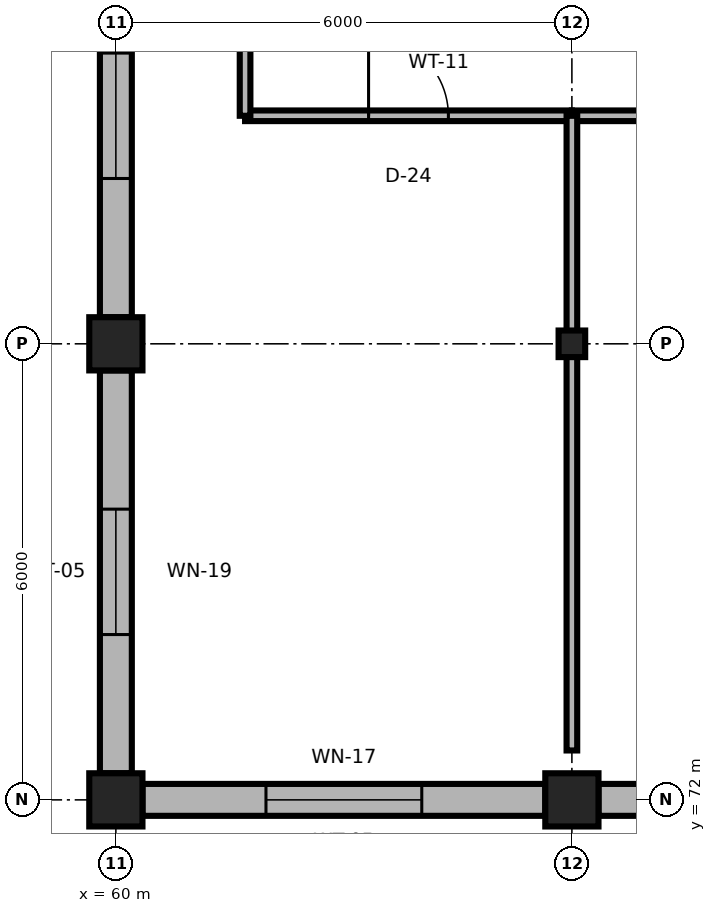
"""IFC4 building model, lengths in metres.
Left out: names, types, materials, properties, quantities, classifications, styles, units other than length and angle.
Written with IfcOpenShell. Run it as: python <this file> out.ifc"""

import sys

from ifc_helpers import new_model, si_unit, direction, frame, frame_2d, origin, origin_2d, place, context, subcontext, project, spatial, rectangle, i_section, extrude, element, fill, save


model = new_model("IFC4")
c1 = context("Model", 3, precision=1e-05, world=origin(), true_north=direction((0.0, 1.0)))
c2 = subcontext(c1, "Body", "Model", "MODEL_VIEW")
j1 = project(units=[si_unit("LENGTHUNIT", "METRE"), si_unit("PLANEANGLEUNIT", "RADIAN")], contexts=[c1])
p1 = place(None, origin())
s1 = spatial("IfcSite", under=j1, at=p1, CompositionType="ELEMENT")
p2 = place(p1, origin())
s2 = spatial("IfcBuilding", under=s1, at=p2, CompositionType="ELEMENT")
p3 = place(p2, frame((0.0, 0.0, 40.5)))
s3 = spatial("IfcBuildingStorey", under=s2, at=p3, CompositionType="ELEMENT", Elevation=40.5)
for number, where, z_axis, x_axis in (
    (1, (60.0, 72.0, 0.0), (0.0, 0.0, 1.0), (1.0, 0.0, 0.0)),
    (2, (66.0, 72.0, 0.0), (0.0, 0.0, 1.0), (1.0, 0.0, 0.0)),
    (3, (60.0, 78.0, 0.0), (0.0, 0.0, 1.0), (1.0, 0.0, 0.0)),
):
    element("IfcColumn", number, at=place(p3, frame(where, z_axis=z_axis, x_axis=x_axis)), inside=s3, PredefinedType="COLUMN", context=c2, shape_type="SweptSolid", body=[
        extrude(rectangle(XDim=0.7, YDim=0.7, at=origin_2d()), origin(), (0.0, 0.0, 1.0), 3.9),
    ])
p4 = place(p3, frame((66.0, 78.0, 0.0), z_axis=(0.0, 0.0, 1.0), x_axis=(1.0, 0.0, 0.0)))
e4 = element("IfcColumn", 4, at=p4, inside=s3, PredefinedType="COLUMN", context=c2, shape_type="SweptSolid", body=[
    extrude(i_section(OverallWidth=0.35, OverallDepth=0.35, WebThickness=0.012, FlangeThickness=0.019, FilletRadius=0.02, at=origin_2d()), origin(), (0.0, 0.0, 1.0), 3.9),
])
p5 = place(p3, frame((60.35, 72.0, 0.0), z_axis=(0.0, 0.0, 1.0), x_axis=(1.0, 0.0, 0.0)))
e5 = element("IfcWall", 5, at=p5, inside=s3, PredefinedType="SOLIDWALL", context=c2, shape_type="SweptSolid", body=[
    extrude(rectangle(XDim=5.3, YDim=0.42, at=frame_2d((2.65, 0.0))), origin(), (0.0, 0.0, 1.0), 3.32),
])
p6 = place(p5, frame((1.625, 0.0, 0.85)))
e6 = element("IfcOpeningElement", 6, at=p6, cuts=e5, PredefinedType="OPENING", context=c2, shape_type="SweptSolid", body=[
    extrude(rectangle(XDim=2.05, YDim=2.0, at=frame_2d((1.025, 1.0))), frame((0.0, 0.225, 0.0), z_axis=(0.0, -1.0, 0.0), x_axis=(1.0, 0.0, 0.0)), (0.0, 0.0, 1.0), 0.45),
])
p7 = place(p3, frame((66.35, 72.0, 0.0), z_axis=(0.0, 0.0, 1.0), x_axis=(1.0, 0.0, 0.0)))
e7 = element("IfcWall", 7, at=p7, inside=s3, PredefinedType="SOLIDWALL", context=c2, shape_type="SweptSolid", body=[
    extrude(rectangle(XDim=5.3, YDim=0.42, at=frame_2d((2.65, 0.0))), origin(), (0.0, 0.0, 1.0), 3.32),
])
p8 = place(p7, frame((1.625, 0.0, 0.85)))
e8 = element("IfcOpeningElement", 8, at=p8, cuts=e7, PredefinedType="OPENING", context=c2, shape_type="SweptSolid", body=[
    extrude(rectangle(XDim=2.05, YDim=2.0, at=frame_2d((1.025, 1.0))), frame((0.0, 0.225, 0.0), z_axis=(0.0, -1.0, 0.0), x_axis=(1.0, 0.0, 0.0)), (0.0, 0.0, 1.0), 0.45),
])
p9 = place(p3, frame((60.0, 72.35, 0.0), z_axis=(0.0, 0.0, 1.0), x_axis=(0.0, 1.0, 0.0)))
e9 = element("IfcWall", 9, at=p9, inside=s3, PredefinedType="SOLIDWALL", context=c2, shape_type="SweptSolid", body=[
    extrude(rectangle(XDim=5.3, YDim=0.42, at=frame_2d((2.65, 0.0))), origin(), (0.0, 0.0, 1.0), 3.32),
])
p10 = place(p9, frame((1.825, 0.0, 0.85)))
e10 = element("IfcOpeningElement", 10, at=p10, cuts=e9, PredefinedType="OPENING", context=c2, shape_type="SweptSolid", body=[
    extrude(rectangle(XDim=1.65, YDim=1.95, at=frame_2d((0.825, 0.975))), frame((0.0, 0.225, 0.0), z_axis=(0.0, -1.0, 0.0), x_axis=(1.0, 0.0, 0.0)), (0.0, 0.0, 1.0), 0.45),
])
p11 = place(p3, frame((60.0, 78.35, 0.0), z_axis=(0.0, 0.0, 1.0), x_axis=(0.0, 1.0, 0.0)))
e11 = element("IfcWall", 11, at=p11, inside=s3, PredefinedType="SOLIDWALL", context=c2, shape_type="SweptSolid", body=[
    extrude(rectangle(XDim=5.3, YDim=0.42, at=frame_2d((2.65, 0.0))), origin(), (0.0, 0.0, 1.0), 3.32),
])
p12 = place(p11, frame((1.825, 0.0, 0.85)))
e12 = element("IfcOpeningElement", 12, at=p12, cuts=e11, PredefinedType="OPENING", context=c2, shape_type="SweptSolid", body=[
    extrude(rectangle(XDim=1.65, YDim=1.95, at=frame_2d((0.825, 0.975))), frame((0.0, 0.225, 0.0), z_axis=(0.0, -1.0, 0.0), x_axis=(1.0, 0.0, 0.0)), (0.0, 0.0, 1.0), 0.45),
])
p13 = place(p3, frame((61.7, 81.0, 0.0), z_axis=(0.0, 0.0, 1.0), x_axis=(1.0, 0.0, 0.0)))
e13 = element("IfcWall", 13, at=p13, inside=s3, PredefinedType="PARTITIONING", context=c2, shape_type="SweptSolid", body=[
    extrude(rectangle(XDim=4.3, YDim=0.14, at=frame_2d((2.15, 0.0))), origin(), (0.0, 0.0, 1.0), 3.74),
])
p14 = place(p13, frame((1.625, 0.0, 0.0)))
e14 = element("IfcOpeningElement", 14, at=p14, cuts=e13, PredefinedType="OPENING", context=c2, shape_type="SweptSolid", body=[
    extrude(rectangle(XDim=1.05, YDim=2.25, at=frame_2d((0.525, 1.125))), frame((0.0, 0.085, 0.0), z_axis=(0.0, -1.0, 0.0), x_axis=(1.0, 0.0, 0.0)), (0.0, 0.0, 1.0), 0.17),
])
p15 = place(p3, frame((66.0, 81.0, 0.0), z_axis=(0.0, 0.0, 1.0), x_axis=(1.0, 0.0, 0.0)))
e15 = element("IfcWall", 15, at=p15, inside=s3, PredefinedType="PARTITIONING", context=c2, shape_type="SweptSolid", body=[
    extrude(rectangle(XDim=6.0, YDim=0.14, at=frame_2d((3.0, 0.0))), origin(), (0.0, 0.0, 1.0), 3.74),
])
p16 = place(p15, frame((2.475, 0.0, 0.0)))
e16 = element("IfcOpeningElement", 16, at=p16, cuts=e15, PredefinedType="OPENING", context=c2, shape_type="SweptSolid", body=[
    extrude(rectangle(XDim=1.05, YDim=2.25, at=frame_2d((0.525, 1.125))), frame((0.0, 0.085, 0.0), z_axis=(0.0, -1.0, 0.0), x_axis=(1.0, 0.0, 0.0)), (0.0, 0.0, 1.0), 0.17),
])
p17 = place(p3, frame((66.0, 72.65, 0.0), z_axis=(0.0, 0.0, 1.0), x_axis=(0.0, 1.0, 0.0)))
e17 = element("IfcWall", 17, at=p17, inside=s3, PredefinedType="PARTITIONING", context=c2, shape_type="SweptSolid", body=[
    extrude(rectangle(XDim=8.35, YDim=0.14, at=frame_2d((4.175, 0.0))), origin(), (0.0, 0.0, 1.0), 3.348),
])
p18 = place(p3, frame((61.7, 81.0, 0.0), z_axis=(0.0, 0.0, 1.0), x_axis=(0.0, 1.0, 0.0)))
e18 = element("IfcWall", 18, at=p18, inside=s3, PredefinedType="PARTITIONING", context=c2, shape_type="SweptSolid", body=[
    extrude(rectangle(XDim=1.15, YDim=0.14, at=frame_2d((0.575, 0.0))), origin(), (0.0, 0.0, 1.0), 3.74),
])
p19 = place(p6, origin())
e19 = element("IfcWindow", 19, at=p19, inside=s3, PartitioningType="SINGLE_PANEL", PredefinedType="WINDOW", context=c2, shape_type="SweptSolid", body=[
    extrude(rectangle(XDim=2.05, YDim=2.0, at=frame_2d((1.025, 1.0))), frame((0.0, 0.03, 0.0), z_axis=(0.0, -1.0, 0.0), x_axis=(1.0, 0.0, 0.0)), (0.0, 0.0, 1.0), 0.06),
])
fill(e6, e19)
p20 = place(p10, origin())
e20 = element("IfcWindow", 20, at=p20, inside=s3, PartitioningType="SINGLE_PANEL", PredefinedType="WINDOW", context=c2, shape_type="SweptSolid", body=[
    extrude(rectangle(XDim=1.65, YDim=1.95, at=frame_2d((0.825, 0.975))), frame((0.0, 0.03, 0.0), z_axis=(0.0, -1.0, 0.0), x_axis=(1.0, 0.0, 0.0)), (0.0, 0.0, 1.0), 0.06),
])
fill(e10, e20)
p21 = place(p12, origin())
e21 = element("IfcWindow", 21, at=p21, inside=s3, PartitioningType="SINGLE_PANEL", PredefinedType="WINDOW", context=c2, shape_type="SweptSolid", body=[
    extrude(rectangle(XDim=1.65, YDim=1.95, at=frame_2d((0.825, 0.975))), frame((0.0, 0.03, 0.0), z_axis=(0.0, -1.0, 0.0), x_axis=(1.0, 0.0, 0.0)), (0.0, 0.0, 1.0), 0.06),
])
fill(e12, e21)
p22 = place(p14, origin())
e22 = element("IfcDoor", 22, at=p22, inside=s3, OperationType="SINGLE_SWING_LEFT", PredefinedType="DOOR", context=c2, shape_type="SweptSolid", body=[
    extrude(rectangle(XDim=1.05, YDim=2.25, at=frame_2d((0.525, 1.125))), frame((0.0, 0.025, 0.0), z_axis=(0.0, -1.0, 0.0), x_axis=(1.0, 0.0, 0.0)), (0.0, 0.0, 1.0), 0.05),
])
fill(e14, e22)
save(model, sys.argv[1])
